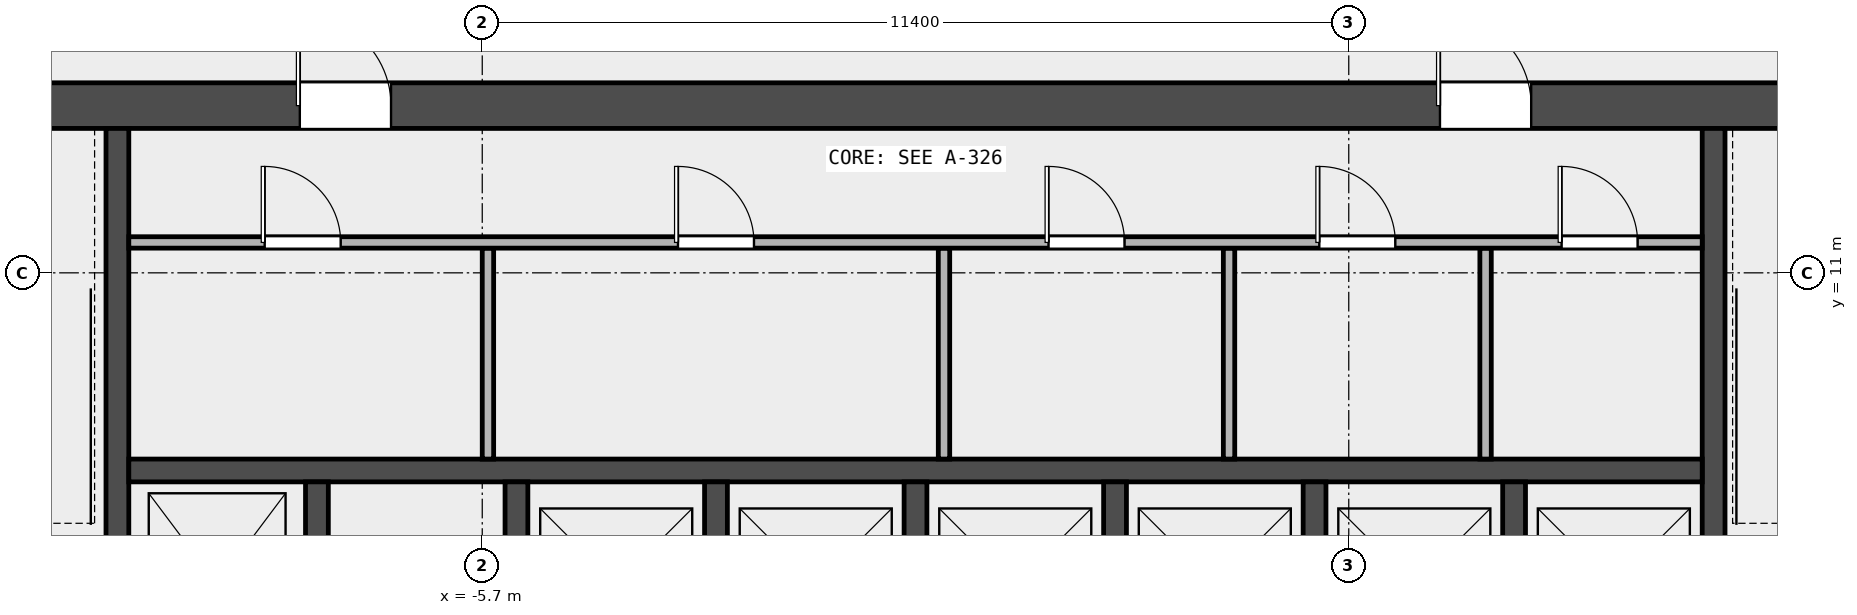
"""IFC4 building model, lengths in metres.
Left out: names, types, materials, properties, quantities, classifications, styles, units other than length and angle.
Written with IfcOpenShell. Run it as: python <this file> out.ifc"""

import sys

from ifc_helpers import new_model, si_unit, direction, frame, frame_2d, origin, place, context, subcontext, project, spatial, rectangle, extrude, element, fill, save


model = new_model("IFC4")
c1 = context("Model", 3, precision=1e-05, world=origin(), true_north=direction((0.0, 1.0)))
c2 = subcontext(c1, "Body", "Model", "MODEL_VIEW")
j1 = project(units=[si_unit("LENGTHUNIT", "METRE"), si_unit("PLANEANGLEUNIT", "RADIAN")], contexts=[c1])
p1 = place(None, origin())
s1 = spatial("IfcSite", under=j1, at=p1, CompositionType="ELEMENT")
p2 = place(p1, origin())
s2 = spatial("IfcBuilding", under=s1, at=p2, CompositionType="ELEMENT")
p3 = place(p2, frame((0.0, 0.0, 275.4)))
s3 = spatial("IfcBuildingStorey", under=s2, at=p3, CompositionType="ELEMENT", Elevation=275.4)
p4 = place(p3, frame((-14.4, 13.2, 0.0), z_axis=(0.0, 0.0, 1.0), x_axis=(1.0, 0.0, 0.0)))
e1 = element("IfcWall", 1, at=p4, inside=s3, PredefinedType="SHEAR", context=c2, shape_type="SweptSolid", body=[
    extrude(rectangle(XDim=28.8, YDim=0.6, at=frame_2d((14.4, 0.0))), origin(), (0.0, 0.0, 1.0), 3.7),
])
p5 = place(p4, frame((6.3, 0.0, 0.0)))
e2 = element("IfcOpeningElement", 2, at=p5, cuts=e1, PredefinedType="OPENING", context=c2, shape_type="SweptSolid", body=[
    extrude(rectangle(XDim=1.2, YDim=2.1, at=frame_2d((0.6, 1.05))), frame((0.0, 0.312, 0.0), z_axis=(0.0, -1.0, 0.0), x_axis=(1.0, 0.0, 0.0)), (0.0, 0.0, 1.0), 0.624),
])
p6 = place(p4, frame((21.3, 0.0, 0.0)))
e3 = element("IfcOpeningElement", 3, at=p6, cuts=e1, PredefinedType="OPENING", context=c2, shape_type="SweptSolid", body=[
    extrude(rectangle(XDim=1.2, YDim=2.1, at=frame_2d((0.6, 1.05))), frame((0.0, 0.312, 0.0), z_axis=(0.0, -1.0, 0.0), x_axis=(1.0, 0.0, 0.0)), (0.0, 0.0, 1.0), 0.624),
])
for number, where, z_axis, x_axis in (
    (4, (-10.5, 5.25, 0.0), (0.0, 0.0, 1.0), (0.0, 1.0, 0.0)),
    (5, (10.5, 5.25, 0.0), (0.0, 0.0, 1.0), (0.0, 1.0, 0.0)),
):
    element("IfcWall", number, at=place(p3, frame(where, z_axis=z_axis, x_axis=x_axis)), inside=s3, PredefinedType="SHEAR", context=c2, shape_type="SweptSolid", body=[
        extrude(rectangle(XDim=7.65, YDim=0.3, at=frame_2d((3.825, 0.0))), origin(), (0.0, 0.0, 1.0), 3.7),
    ])
p7 = place(p3, frame((-10.35, 8.4, 0.0), z_axis=(0.0, 0.0, 1.0), x_axis=(1.0, 0.0, 0.0)))
e6 = element("IfcWall", 6, at=p7, inside=s3, PredefinedType="SOLIDWALL", context=c2, shape_type="SweptSolid", body=[
    extrude(rectangle(XDim=20.7, YDim=0.3, at=frame_2d((10.35, 0.0))), origin(), (0.0, 0.0, 1.0), 3.7),
])
for number, where, z_axis, x_axis in (
    (7, (-7.875, 5.55, 0.0), (0.0, 0.0, 1.0), (0.0, 1.0, 0.0)),
    (8, (-5.25, 5.55, 0.0), (0.0, 0.0, 1.0), (0.0, 1.0, 0.0)),
    (9, (-2.625, 5.55, 0.0), (0.0, 0.0, 1.0), (0.0, 1.0, 0.0)),
    (10, (0.0, 5.55, 0.0), (0.0, 0.0, 1.0), (0.0, 1.0, 0.0)),
    (11, (2.625, 5.55, 0.0), (0.0, 0.0, 1.0), (0.0, 1.0, 0.0)),
    (12, (5.25, 5.55, 0.0), (0.0, 0.0, 1.0), (0.0, 1.0, 0.0)),
    (13, (7.875, 5.55, 0.0), (0.0, 0.0, 1.0), (0.0, 1.0, 0.0)),
):
    element("IfcWall", number, at=place(p3, frame(where, z_axis=z_axis, x_axis=x_axis)), inside=s3, PredefinedType="SOLIDWALL", context=c2, shape_type="SweptSolid", body=[
        extrude(rectangle(XDim=2.7, YDim=0.3, at=frame_2d((1.35, 0.0))), origin(), (0.0, 0.0, 1.0), 3.7),
    ])
for number, where, z_axis, x_axis in (
    (14, (-5.625, 8.55, 0.0), (0.0, 0.0, 1.0), (0.0, 1.0, 0.0)),
    (15, (0.375, 8.55, 0.0), (0.0, 0.0, 1.0), (0.0, 1.0, 0.0)),
    (16, (4.125, 8.55, 0.0), (0.0, 0.0, 1.0), (0.0, 1.0, 0.0)),
    (17, (7.5, 8.55, 0.0), (0.0, 0.0, 1.0), (0.0, 1.0, 0.0)),
):
    element("IfcWall", number, at=place(p3, frame(where, z_axis=z_axis, x_axis=x_axis)), inside=s3, PredefinedType="PARTITIONING", context=c2, shape_type="SweptSolid", body=[
        extrude(rectangle(XDim=2.775, YDim=0.15, at=frame_2d((1.387, 0.0))), origin(), (0.0, 0.0, 1.0), 3.7),
    ])
p8 = place(p3, frame((-10.35, 11.4, 0.0), z_axis=(0.0, 0.0, 1.0), x_axis=(1.0, 0.0, 0.0)))
e18 = element("IfcWall", 18, at=p8, inside=s3, PredefinedType="PARTITIONING", context=c2, shape_type="SweptSolid", body=[
    extrude(rectangle(XDim=20.7, YDim=0.15, at=frame_2d((10.35, 0.0))), origin(), (0.0, 0.0, 1.0), 3.7),
])
p9 = place(p8, frame((1.788, 0.0, 0.0)))
e19 = element("IfcOpeningElement", 19, at=p9, cuts=e18, PredefinedType="OPENING", context=c2, shape_type="SweptSolid", body=[
    extrude(rectangle(XDim=1.0, YDim=2.1, at=frame_2d((0.5, 1.05))), frame((0.0, 0.087, 0.0), z_axis=(0.0, -1.0, 0.0), x_axis=(1.0, 0.0, 0.0)), (0.0, 0.0, 1.0), 0.174),
])
p10 = place(p8, frame((7.225, 0.0, 0.0)))
e20 = element("IfcOpeningElement", 20, at=p10, cuts=e18, PredefinedType="OPENING", context=c2, shape_type="SweptSolid", body=[
    extrude(rectangle(XDim=1.0, YDim=2.1, at=frame_2d((0.5, 1.05))), frame((0.0, 0.087, 0.0), z_axis=(0.0, -1.0, 0.0), x_axis=(1.0, 0.0, 0.0)), (0.0, 0.0, 1.0), 0.174),
])
p11 = place(p8, frame((12.1, 0.0, 0.0)))
e21 = element("IfcOpeningElement", 21, at=p11, cuts=e18, PredefinedType="OPENING", context=c2, shape_type="SweptSolid", body=[
    extrude(rectangle(XDim=1.0, YDim=2.1, at=frame_2d((0.5, 1.05))), frame((0.0, 0.087, 0.0), z_axis=(0.0, -1.0, 0.0), x_axis=(1.0, 0.0, 0.0)), (0.0, 0.0, 1.0), 0.174),
])
p12 = place(p8, frame((15.663, 0.0, 0.0)))
e22 = element("IfcOpeningElement", 22, at=p12, cuts=e18, PredefinedType="OPENING", context=c2, shape_type="SweptSolid", body=[
    extrude(rectangle(XDim=1.0, YDim=2.1, at=frame_2d((0.5, 1.05))), frame((0.0, 0.087, 0.0), z_axis=(0.0, -1.0, 0.0), x_axis=(1.0, 0.0, 0.0)), (0.0, 0.0, 1.0), 0.174),
])
p13 = place(p8, frame((18.85, 0.0, 0.0)))
e23 = element("IfcOpeningElement", 23, at=p13, cuts=e18, PredefinedType="OPENING", context=c2, shape_type="SweptSolid", body=[
    extrude(rectangle(XDim=1.0, YDim=2.1, at=frame_2d((0.5, 1.05))), frame((0.0, 0.087, 0.0), z_axis=(0.0, -1.0, 0.0), x_axis=(1.0, 0.0, 0.0)), (0.0, 0.0, 1.0), 0.174),
])
p14 = place(p9, origin())
e24 = element("IfcDoor", 24, at=p14, inside=s3, OperationType="SINGLE_SWING_LEFT", PredefinedType="DOOR", context=c2, shape_type="SweptSolid", body=[
    extrude(rectangle(XDim=1.0, YDim=2.1, at=frame_2d((0.5, 1.05))), frame((0.0, 0.025, 0.0), z_axis=(0.0, -1.0, 0.0), x_axis=(1.0, 0.0, 0.0)), (0.0, 0.0, 1.0), 0.05),
])
fill(e19, e24)
p15 = place(p10, origin())
e25 = element("IfcDoor", 25, at=p15, inside=s3, OperationType="SINGLE_SWING_LEFT", PredefinedType="DOOR", context=c2, shape_type="SweptSolid", body=[
    extrude(rectangle(XDim=1.0, YDim=2.1, at=frame_2d((0.5, 1.05))), frame((0.0, 0.025, 0.0), z_axis=(0.0, -1.0, 0.0), x_axis=(1.0, 0.0, 0.0)), (0.0, 0.0, 1.0), 0.05),
])
fill(e20, e25)
p16 = place(p11, origin())
e26 = element("IfcDoor", 26, at=p16, inside=s3, OperationType="SINGLE_SWING_LEFT", PredefinedType="DOOR", context=c2, shape_type="SweptSolid", body=[
    extrude(rectangle(XDim=1.0, YDim=2.1, at=frame_2d((0.5, 1.05))), frame((0.0, 0.025, 0.0), z_axis=(0.0, -1.0, 0.0), x_axis=(1.0, 0.0, 0.0)), (0.0, 0.0, 1.0), 0.05),
])
fill(e21, e26)
p17 = place(p12, origin())
e27 = element("IfcDoor", 27, at=p17, inside=s3, OperationType="SINGLE_SWING_LEFT", PredefinedType="DOOR", context=c2, shape_type="SweptSolid", body=[
    extrude(rectangle(XDim=1.0, YDim=2.1, at=frame_2d((0.5, 1.05))), frame((0.0, 0.025, 0.0), z_axis=(0.0, -1.0, 0.0), x_axis=(1.0, 0.0, 0.0)), (0.0, 0.0, 1.0), 0.05),
])
fill(e22, e27)
p18 = place(p13, origin())
e28 = element("IfcDoor", 28, at=p18, inside=s3, OperationType="SINGLE_SWING_LEFT", PredefinedType="DOOR", context=c2, shape_type="SweptSolid", body=[
    extrude(rectangle(XDim=1.0, YDim=2.1, at=frame_2d((0.5, 1.05))), frame((0.0, 0.025, 0.0), z_axis=(0.0, -1.0, 0.0), x_axis=(1.0, 0.0, 0.0)), (0.0, 0.0, 1.0), 0.05),
])
fill(e23, e28)
p19 = place(p5, origin())
e29 = element("IfcDoor", 29, at=p19, inside=s3, OperationType="SINGLE_SWING_LEFT", PredefinedType="DOOR", context=c2, shape_type="SweptSolid", body=[
    extrude(rectangle(XDim=1.2, YDim=2.1, at=frame_2d((0.6, 1.05))), frame((0.0, 0.025, 0.0), z_axis=(0.0, -1.0, 0.0), x_axis=(1.0, 0.0, 0.0)), (0.0, 0.0, 1.0), 0.05),
])
fill(e2, e29)
p20 = place(p6, origin())
e30 = element("IfcDoor", 30, at=p20, inside=s3, OperationType="SINGLE_SWING_RIGHT", PredefinedType="DOOR", context=c2, shape_type="SweptSolid", body=[
    extrude(rectangle(XDim=1.2, YDim=2.1, at=frame_2d((0.6, 1.05))), frame((0.0, 0.025, 0.0), z_axis=(0.0, -1.0, 0.0), x_axis=(1.0, 0.0, 0.0)), (0.0, 0.0, 1.0), 0.05),
])
fill(e3, e30)
save(model, sys.argv[1])
